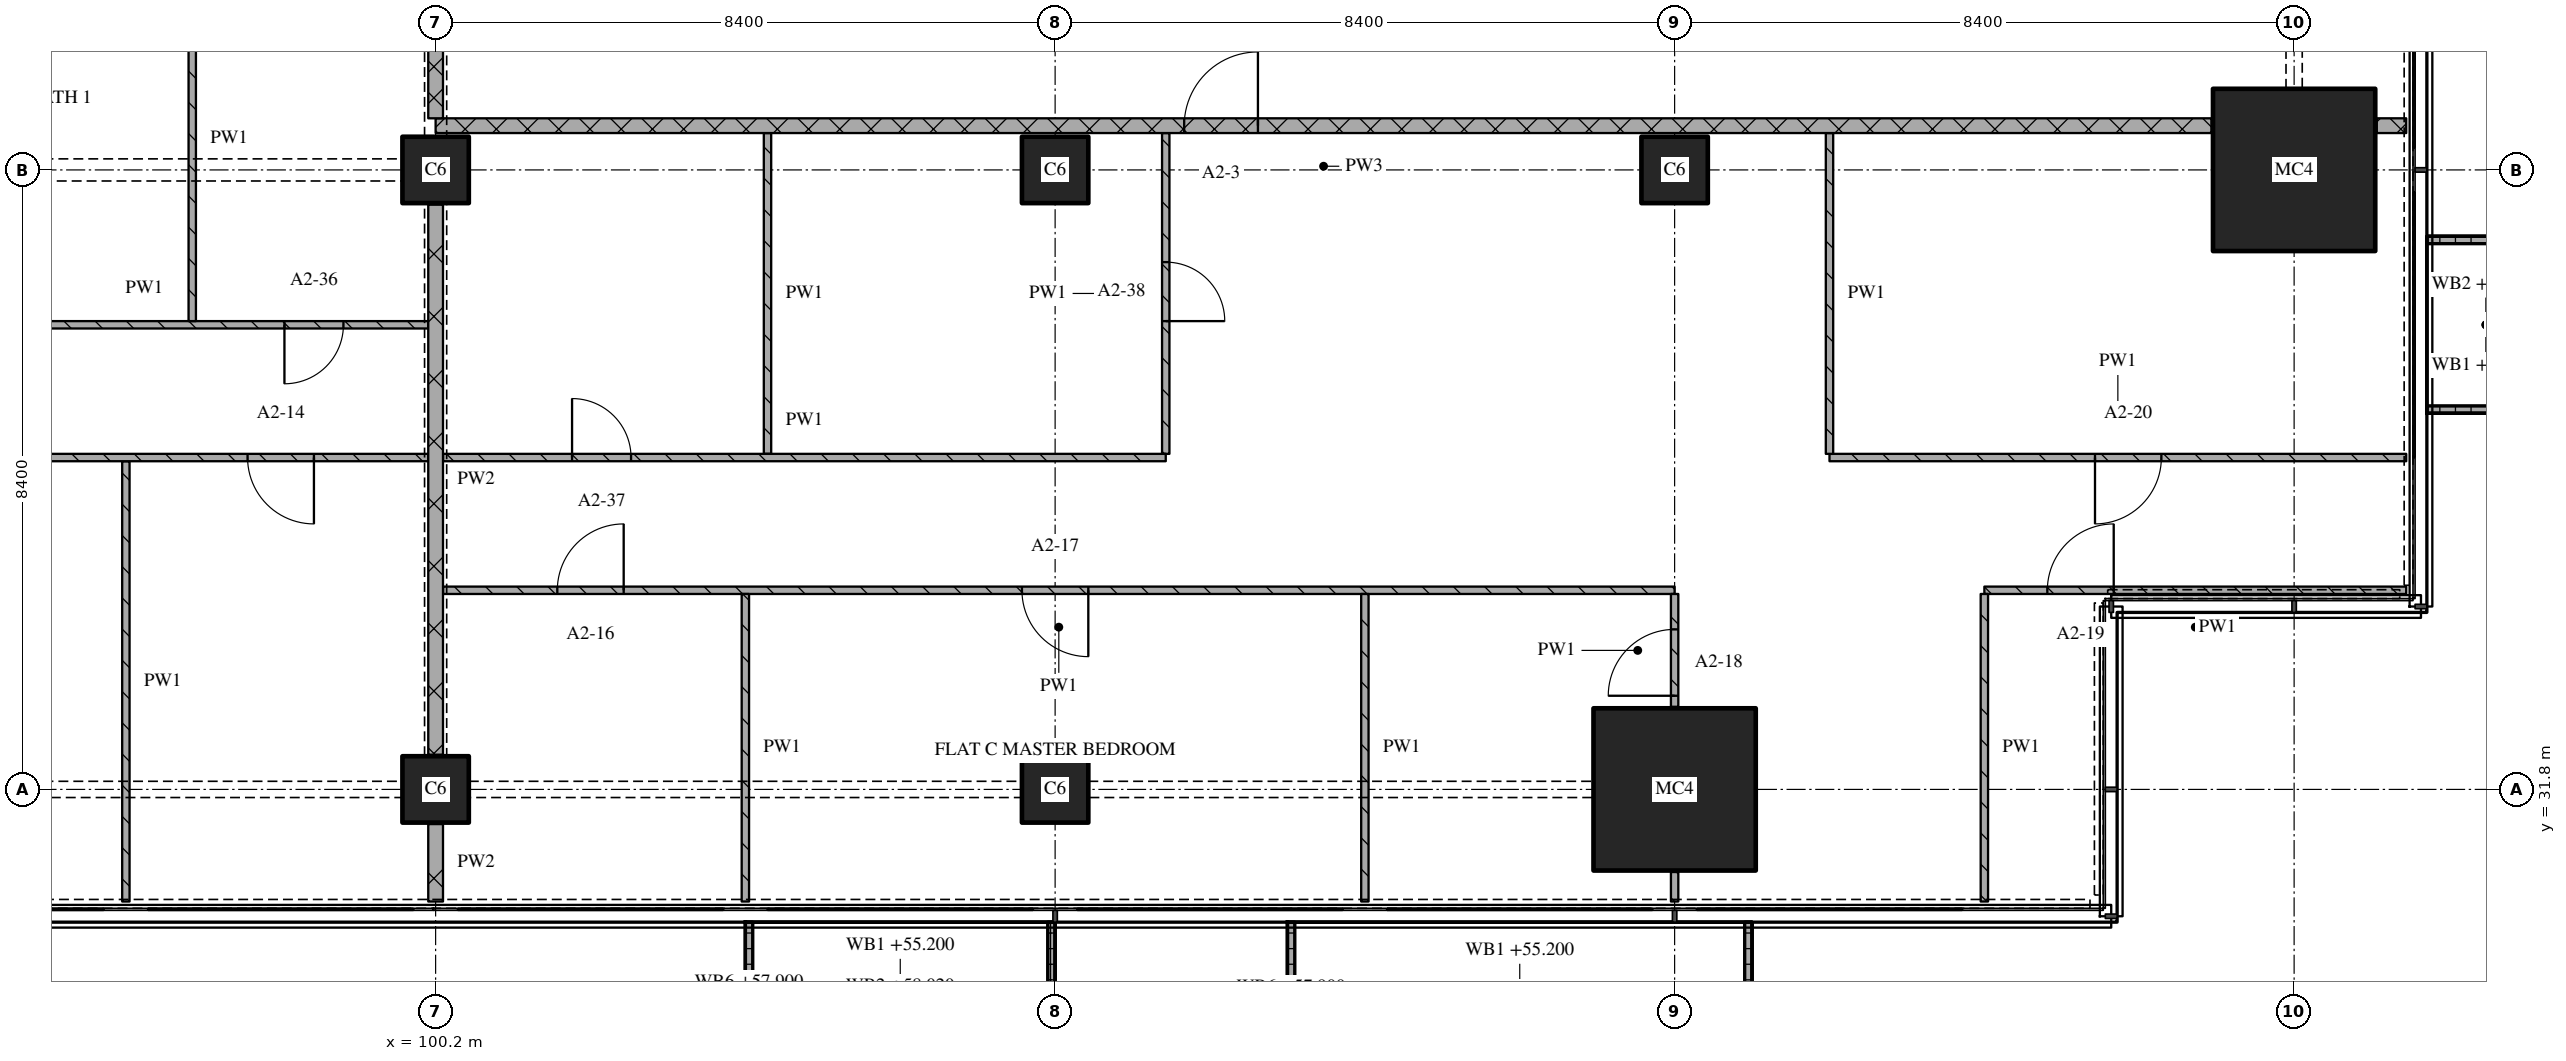
"""IFC4 building model, lengths in metres.
Left out: names, types, materials, properties, quantities, classifications, styles, units other than length and angle.
Written with IfcOpenShell. Run it as: python <this file> out.ifc"""

import sys

from ifc_helpers import new_model, si_unit, direction, frame, frame_2d, origin, origin_2d, place, context, subcontext, project, spatial, polyline, rectangle, outline, extrude, element, fill, save


model = new_model("IFC4")
c1 = context("Model", 3, precision=1e-05, world=origin(), true_north=direction((0.0, 1.0)))
c2 = subcontext(c1, "Body", "Model", "MODEL_VIEW")
j1 = project(units=[si_unit("LENGTHUNIT", "METRE"), si_unit("PLANEANGLEUNIT", "RADIAN")], contexts=[c1])
p1 = place(None, origin())
s1 = spatial("IfcSite", under=j1, at=p1, CompositionType="ELEMENT")
p2 = place(p1, origin())
s2 = spatial("IfcBuilding", under=s1, at=p2, CompositionType="ELEMENT")
p3 = place(p2, frame((0.0, 0.0, 55.2)))
s3 = spatial("IfcBuildingStorey", under=s2, at=p3, CompositionType="ELEMENT", Elevation=55.2)
for number, where, z_axis, x_axis in (
    (1, (100.2, 31.8, 0.0), (0.0, 0.0, 1.0), (1.0, 0.0, 0.0)),
    (2, (100.2, 40.2, 0.0), (0.0, 0.0, 1.0), (1.0, 0.0, 0.0)),
    (3, (108.6, 31.8, 0.0), (0.0, 0.0, 1.0), (1.0, 0.0, 0.0)),
    (4, (108.6, 40.2, 0.0), (0.0, 0.0, 1.0), (1.0, 0.0, 0.0)),
):
    element("IfcColumn", number, at=place(p3, frame(where, z_axis=z_axis, x_axis=x_axis)), inside=s3, PredefinedType="COLUMN", context=c2, shape_type="SweptSolid", body=[
        extrude(rectangle(XDim=0.9, YDim=0.9, at=origin_2d()), origin(), (0.0, 0.0, 1.0), 3.6),
    ])
p4 = place(p3, frame((117.0, 31.8, 0.0), z_axis=(0.0, 0.0, 1.0), x_axis=(1.0, 0.0, 0.0)))
e5 = element("IfcColumn", 5, at=p4, inside=s3, PredefinedType="COLUMN", context=c2, shape_type="SweptSolid", body=[
    extrude(rectangle(XDim=2.2, YDim=2.2, at=origin_2d()), origin(), (0.0, 0.0, 1.0), 3.6),
])
p5 = place(p3, frame((117.0, 40.2, 0.0), z_axis=(0.0, 0.0, 1.0), x_axis=(1.0, 0.0, 0.0)))
e6 = element("IfcColumn", 6, at=p5, inside=s3, PredefinedType="COLUMN", context=c2, shape_type="SweptSolid", body=[
    extrude(rectangle(XDim=0.9, YDim=0.9, at=origin_2d()), origin(), (0.0, 0.0, 1.0), 3.6),
])
p6 = place(p3, frame((125.4, 40.2, 0.0), z_axis=(0.0, 0.0, 1.0), x_axis=(1.0, 0.0, 0.0)))
e7 = element("IfcColumn", 7, at=p6, inside=s3, PredefinedType="COLUMN", context=c2, shape_type="SweptSolid", body=[
    extrude(rectangle(XDim=2.2, YDim=2.2, at=origin_2d()), origin(), (0.0, 0.0, 1.0), 3.6),
])
p7 = place(p3, origin())
e8 = element("IfcWall", 8, at=p7, inside=s3, PredefinedType="SOLIDWALL", context=c2, shape_type="SweptSolid", body=[
    extrude(outline(polyline([(104.4, 30.0), (104.5, 30.0), (104.5, 28.367), (108.5, 28.367), (108.5, 30.0), (108.6, 30.0), (108.6, 28.267), (104.4, 28.267), (104.4, 30.0)])), origin(), (0.0, 0.0, 1.0), 1.0),
])
p8 = place(p3, origin())
e9 = element("IfcWall", 9, at=p8, inside=s3, PredefinedType="SOLIDWALL", context=c2, shape_type="SweptSolid", body=[
    extrude(outline(polyline([(111.75, 30.0), (111.85, 30.0), (111.85, 28.233), (117.95, 28.233), (117.95, 30.0), (118.05, 30.0), (118.05, 28.133), (111.75, 28.133), (111.75, 30.0)])), origin(), (0.0, 0.0, 1.0), 1.0),
])
p9 = place(p3, origin())
e10 = element("IfcWall", 10, at=p9, inside=s3, PredefinedType="SOLIDWALL", context=c2, shape_type="SweptSolid", body=[
    extrude(outline(polyline([(127.2, 36.9), (127.2, 37.0), (128.7, 37.0), (128.7, 39.2), (127.2, 39.2), (127.2, 39.3), (128.8, 39.3), (128.8, 36.9), (127.2, 36.9)])), origin(), (0.0, 0.0, 1.0), 1.0),
])
p10 = place(p3, frame((117.0, 34.5, 0.0), z_axis=(0.0, 0.0, 1.0), x_axis=(-1.0, 0.0, 0.0)))
e11 = element("IfcWall", 11, at=p10, inside=s3, PredefinedType="PARTITIONING", context=c2, shape_type="SweptSolid", body=[
    extrude(rectangle(XDim=16.7, YDim=0.1, at=frame_2d((8.35, 0.0))), origin(), (0.0, 0.0, 1.0), 3.32),
])
p11 = place(p10, frame((7.95, 0.0, 0.0)))
e12 = element("IfcOpeningElement", 12, at=p11, cuts=e11, PredefinedType="OPENING", context=c2, shape_type="SweptSolid", body=[
    extrude(rectangle(XDim=0.9, YDim=2.1, at=frame_2d((0.45, 1.05))), frame((0.0, 0.06, 0.0), z_axis=(0.0, -1.0, 0.0), x_axis=(1.0, 0.0, 0.0)), (0.0, 0.0, 1.0), 0.12),
])
p12 = place(p10, frame((14.25, 0.0, 0.0)))
e13 = element("IfcOpeningElement", 13, at=p12, cuts=e11, PredefinedType="OPENING", context=c2, shape_type="SweptSolid", body=[
    extrude(rectangle(XDim=0.9, YDim=2.1, at=frame_2d((0.45, 1.05))), frame((0.0, 0.06, 0.0), z_axis=(0.0, -1.0, 0.0), x_axis=(1.0, 0.0, 0.0)), (0.0, 0.0, 1.0), 0.12),
])
p13 = place(p3, frame((126.92, 34.5, 0.0), z_axis=(0.0, 0.0, 1.0), x_axis=(-1.0, 0.0, 0.0)))
e14 = element("IfcWall", 14, at=p13, inside=s3, PredefinedType="PARTITIONING", context=c2, shape_type="SweptSolid", body=[
    extrude(rectangle(XDim=5.72, YDim=0.1, at=frame_2d((2.86, 0.0))), origin(), (0.0, 0.0, 1.0), 3.32),
])
p14 = place(p13, frame((3.966, 0.0, 0.0)))
e15 = element("IfcOpeningElement", 15, at=p14, cuts=e14, PredefinedType="OPENING", context=c2, shape_type="SweptSolid", body=[
    extrude(rectangle(XDim=0.9, YDim=2.1, at=frame_2d((0.45, 1.05))), frame((0.0, 0.06, 0.0), z_axis=(0.0, -1.0, 0.0), x_axis=(1.0, 0.0, 0.0)), (0.0, 0.0, 1.0), 0.12),
])
p15 = place(p3, frame((119.1, 36.3, 0.0), z_axis=(0.0, 0.0, 1.0), x_axis=(1.0, 0.0, 0.0)))
e16 = element("IfcWall", 16, at=p15, inside=s3, PredefinedType="PARTITIONING", context=c2, shape_type="SweptSolid", body=[
    extrude(rectangle(XDim=7.82, YDim=0.1, at=frame_2d((3.91, 0.0))), origin(), (0.0, 0.0, 1.0), 3.32),
])
p16 = place(p15, frame((3.6, 0.0, 0.0)))
e17 = element("IfcOpeningElement", 17, at=p16, cuts=e16, PredefinedType="OPENING", context=c2, shape_type="SweptSolid", body=[
    extrude(rectangle(XDim=0.9, YDim=2.1, at=frame_2d((0.45, 1.05))), frame((0.0, 0.06, 0.0), z_axis=(0.0, -1.0, 0.0), x_axis=(1.0, 0.0, 0.0)), (0.0, 0.0, 1.0), 0.12),
])
p17 = place(p3, frame((92.4, 38.1, 0.0), z_axis=(0.0, 0.0, 1.0), x_axis=(1.0, 0.0, 0.0)))
e18 = element("IfcWall", 18, at=p17, inside=s3, PredefinedType="PARTITIONING", context=c2, shape_type="SweptSolid", body=[
    extrude(rectangle(XDim=7.7, YDim=0.1, at=frame_2d((3.85, 0.0))), origin(), (0.0, 0.0, 1.0), 3.32),
])
p18 = place(p17, frame((5.75, 0.0, 0.0)))
e19 = element("IfcOpeningElement", 19, at=p18, cuts=e18, PredefinedType="OPENING", context=c2, shape_type="SweptSolid", body=[
    extrude(rectangle(XDim=0.8, YDim=2.1, at=frame_2d((0.4, 1.05))), frame((0.0, 0.06, 0.0), z_axis=(0.0, -1.0, 0.0), x_axis=(1.0, 0.0, 0.0)), (0.0, 0.0, 1.0), 0.12),
])
p19 = place(p3, frame((124.28, 40.8, 0.0), z_axis=(0.0, 0.0, 1.0), x_axis=(-1.0, 0.0, 0.0)))
e20 = element("IfcWall", 20, at=p19, inside=s3, PredefinedType="PARTITIONING", context=c2, shape_type="SweptSolid", body=[
    extrude(rectangle(XDim=24.08, YDim=0.2, at=frame_2d((12.04, 0.0))), origin(), (0.0, 0.0, 1.0), 3.32),
])
p20 = place(p19, frame((12.93, 0.0, 0.0)))
e21 = element("IfcOpeningElement", 21, at=p20, cuts=e20, PredefinedType="OPENING", context=c2, shape_type="SweptSolid", body=[
    extrude(rectangle(XDim=1.0, YDim=2.1, at=frame_2d((0.5, 1.05))), frame((0.0, 0.11, 0.0), z_axis=(0.0, -1.0, 0.0), x_axis=(1.0, 0.0, 0.0)), (0.0, 0.0, 1.0), 0.22),
])
p21 = place(p3, frame((126.52, 40.8, 0.0), z_axis=(0.0, 0.0, 1.0), x_axis=(1.0, 0.0, 0.0)))
e22 = element("IfcWall", 22, at=p21, inside=s3, PredefinedType="PARTITIONING", context=c2, shape_type="SweptSolid", body=[
    extrude(rectangle(XDim=0.4, YDim=0.2, at=frame_2d((0.2, 0.0))), origin(), (0.0, 0.0, 1.0), 3.32),
])
p22 = place(p3, frame((96.0, 36.25, 0.0), z_axis=(0.0, 0.0, 1.0), x_axis=(0.0, -1.0, 0.0)))
e23 = element("IfcWall", 23, at=p22, inside=s3, PredefinedType="PARTITIONING", context=c2, shape_type="SweptSolid", body=[
    extrude(rectangle(XDim=5.97, YDim=0.1, at=frame_2d((2.985, 0.0))), origin(), (0.0, 0.0, 1.0), 3.32),
])
p23 = place(p3, frame((96.9, 43.1, 0.0), z_axis=(0.0, 0.0, 1.0), x_axis=(0.0, -1.0, 0.0)))
e24 = element("IfcWall", 24, at=p23, inside=s3, PredefinedType="PARTITIONING", context=c2, shape_type="SweptSolid", body=[
    extrude(rectangle(XDim=4.95, YDim=0.1, at=frame_2d((2.475, 0.0))), origin(), (0.0, 0.0, 1.0), 3.32),
])
p24 = place(p3, frame((100.2, 43.1, 0.0), z_axis=(0.0, 0.0, 1.0), x_axis=(0.0, -1.0, 0.0)))
e25 = element("IfcWall", 25, at=p24, inside=s3, PredefinedType="PARTITIONING", context=c2, shape_type="SweptSolid", body=[
    extrude(rectangle(XDim=2.2, YDim=0.2, at=frame_2d((1.1, 0.0))), origin(), (0.0, 0.0, 1.0), 2.43),
])
p25 = place(p3, frame((100.2, 31.33, 0.0), z_axis=(0.0, 0.0, 1.0), x_axis=(0.0, -1.0, 0.0)))
e26 = element("IfcWall", 26, at=p25, inside=s3, PredefinedType="PARTITIONING", context=c2, shape_type="SweptSolid", body=[
    extrude(rectangle(XDim=1.05, YDim=0.2, at=frame_2d((0.525, 0.0))), origin(), (0.0, 0.0, 1.0), 3.32),
])
p26 = place(p3, frame((100.2, 39.73, 0.0), z_axis=(0.0, 0.0, 1.0), x_axis=(0.0, -1.0, 0.0)))
e27 = element("IfcWall", 27, at=p26, inside=s3, PredefinedType="PARTITIONING", context=c2, shape_type="SweptSolid", body=[
    extrude(rectangle(XDim=7.46, YDim=0.2, at=frame_2d((3.73, 0.0))), origin(), (0.0, 0.0, 1.0), 2.83),
])
p27 = place(p3, frame((104.4, 34.45, 0.0), z_axis=(0.0, 0.0, 1.0), x_axis=(0.0, -1.0, 0.0)))
e28 = element("IfcWall", 28, at=p27, inside=s3, PredefinedType="PARTITIONING", context=c2, shape_type="SweptSolid", body=[
    extrude(rectangle(XDim=4.17, YDim=0.1, at=frame_2d((2.085, 0.0))), origin(), (0.0, 0.0, 1.0), 3.32),
])
p28 = place(p3, frame((104.7, 40.7, 0.0), z_axis=(0.0, 0.0, 1.0), x_axis=(0.0, -1.0, 0.0)))
e29 = element("IfcWall", 29, at=p28, inside=s3, PredefinedType="PARTITIONING", context=c2, shape_type="SweptSolid", body=[
    extrude(rectangle(XDim=4.35, YDim=0.1, at=frame_2d((2.175, 0.0))), origin(), (0.0, 0.0, 1.0), 3.32),
])
p29 = place(p3, frame((110.1, 36.35, 0.0), z_axis=(0.0, 0.0, 1.0), x_axis=(0.0, 1.0, 0.0)))
e30 = element("IfcWall", 30, at=p29, inside=s3, PredefinedType="PARTITIONING", context=c2, shape_type="SweptSolid", body=[
    extrude(rectangle(XDim=4.35, YDim=0.1, at=frame_2d((2.175, 0.0))), origin(), (0.0, 0.0, 1.0), 3.32),
])
p30 = place(p29, frame((1.8, 0.0, 0.0)))
e31 = element("IfcOpeningElement", 31, at=p30, cuts=e30, PredefinedType="OPENING", context=c2, shape_type="SweptSolid", body=[
    extrude(rectangle(XDim=0.8, YDim=2.1, at=frame_2d((0.4, 1.05))), frame((0.0, 0.06, 0.0), z_axis=(0.0, -1.0, 0.0), x_axis=(1.0, 0.0, 0.0)), (0.0, 0.0, 1.0), 0.12),
])
p31 = place(p3, frame((112.8, 34.45, 0.0), z_axis=(0.0, 0.0, 1.0), x_axis=(0.0, -1.0, 0.0)))
e32 = element("IfcWall", 32, at=p31, inside=s3, PredefinedType="PARTITIONING", context=c2, shape_type="SweptSolid", body=[
    extrude(rectangle(XDim=4.17, YDim=0.1, at=frame_2d((2.085, 0.0))), origin(), (0.0, 0.0, 1.0), 3.32),
])
p32 = place(p3, frame((117.0, 30.68, 0.0), z_axis=(0.0, 0.0, 1.0), x_axis=(0.0, -1.0, 0.0)))
e33 = element("IfcWall", 33, at=p32, inside=s3, PredefinedType="PARTITIONING", context=c2, shape_type="SweptSolid", body=[
    extrude(rectangle(XDim=0.4, YDim=0.1, at=frame_2d((0.2, 0.0))), origin(), (0.0, 0.0, 1.0), 3.32),
])
p33 = place(p3, frame((117.0, 32.92, 0.0), z_axis=(0.0, 0.0, 1.0), x_axis=(0.0, 1.0, 0.0)))
e34 = element("IfcWall", 34, at=p33, inside=s3, PredefinedType="PARTITIONING", context=c2, shape_type="SweptSolid", body=[
    extrude(rectangle(XDim=1.53, YDim=0.1, at=frame_2d((0.765, 0.0))), origin(), (0.0, 0.0, 1.0), 3.32),
])
p34 = place(p33, frame((0.15, 0.0, 0.0)))
e35 = element("IfcOpeningElement", 35, at=p34, cuts=e34, PredefinedType="OPENING", context=c2, shape_type="SweptSolid", body=[
    extrude(rectangle(XDim=0.9, YDim=2.1, at=frame_2d((0.45, 1.05))), frame((0.0, 0.06, 0.0), z_axis=(0.0, -1.0, 0.0), x_axis=(1.0, 0.0, 0.0)), (0.0, 0.0, 1.0), 0.12),
])
p35 = place(p3, frame((119.1, 40.7, 0.0), z_axis=(0.0, 0.0, 1.0), x_axis=(0.0, -1.0, 0.0)))
e36 = element("IfcWall", 36, at=p35, inside=s3, PredefinedType="PARTITIONING", context=c2, shape_type="SweptSolid", body=[
    extrude(rectangle(XDim=4.35, YDim=0.1, at=frame_2d((2.175, 0.0))), origin(), (0.0, 0.0, 1.0), 3.32),
])
p36 = place(p3, frame((121.2, 34.45, 0.0), z_axis=(0.0, 0.0, 1.0), x_axis=(0.0, -1.0, 0.0)))
e37 = element("IfcWall", 37, at=p36, inside=s3, PredefinedType="PARTITIONING", context=c2, shape_type="SweptSolid", body=[
    extrude(rectangle(XDim=4.17, YDim=0.1, at=frame_2d((2.085, 0.0))), origin(), (0.0, 0.0, 1.0), 3.32),
])
p37 = place(p3, frame((100.1, 36.3, 0.0), z_axis=(0.0, 0.0, 1.0), x_axis=(-1.0, 0.0, 0.0)))
e38 = element("IfcWall", 38, at=p37, inside=s3, PredefinedType="PARTITIONING", context=c2, shape_type="SweptSolid", body=[
    extrude(rectangle(XDim=12.5, YDim=0.1, at=frame_2d((6.25, 0.0))), origin(), (0.0, 0.0, 1.0), 3.32),
])
p38 = place(p37, frame((1.55, 0.0, 0.0)))
e39 = element("IfcOpeningElement", 39, at=p38, cuts=e38, PredefinedType="OPENING", context=c2, shape_type="SweptSolid", body=[
    extrude(rectangle(XDim=0.9, YDim=2.1, at=frame_2d((0.45, 1.05))), frame((0.0, 0.06, 0.0), z_axis=(0.0, -1.0, 0.0), x_axis=(1.0, 0.0, 0.0)), (0.0, 0.0, 1.0), 0.12),
])
p39 = place(p37, frame((7.85, 0.0, 0.0)))
e40 = element("IfcOpeningElement", 40, at=p39, cuts=e38, PredefinedType="OPENING", context=c2, shape_type="SweptSolid", body=[
    extrude(rectangle(XDim=0.9, YDim=2.1, at=frame_2d((0.45, 1.05))), frame((0.0, 0.06, 0.0), z_axis=(0.0, -1.0, 0.0), x_axis=(1.0, 0.0, 0.0)), (0.0, 0.0, 1.0), 0.12),
])
p40 = place(p3, frame((100.3, 36.3, 0.0), z_axis=(0.0, 0.0, 1.0), x_axis=(1.0, 0.0, 0.0)))
e41 = element("IfcWall", 41, at=p40, inside=s3, PredefinedType="PARTITIONING", context=c2, shape_type="SweptSolid", body=[
    extrude(rectangle(XDim=9.8, YDim=0.1, at=frame_2d((4.9, 0.0))), origin(), (0.0, 0.0, 1.0), 3.32),
])
p41 = place(p40, frame((1.75, 0.0, 0.0)))
e42 = element("IfcOpeningElement", 42, at=p41, cuts=e41, PredefinedType="OPENING", context=c2, shape_type="SweptSolid", body=[
    extrude(rectangle(XDim=0.8, YDim=2.1, at=frame_2d((0.4, 1.05))), frame((0.0, 0.06, 0.0), z_axis=(0.0, -1.0, 0.0), x_axis=(1.0, 0.0, 0.0)), (0.0, 0.0, 1.0), 0.12),
])
p42 = place(p11, origin())
e43 = element("IfcDoor", 43, at=p42, inside=s3, OperationType="SINGLE_SWING_LEFT", PredefinedType="DOOR", context=c2, shape_type="SweptSolid", body=[
    extrude(rectangle(XDim=0.9, YDim=2.1, at=frame_2d((0.45, 1.05))), frame((0.0, 0.025, 0.0), z_axis=(0.0, -1.0, 0.0), x_axis=(1.0, 0.0, 0.0)), (0.0, 0.0, 1.0), 0.05),
])
fill(e12, e43)
p43 = place(p12, origin())
e44 = element("IfcDoor", 44, at=p43, inside=s3, OperationType="SINGLE_SWING_RIGHT", PredefinedType="DOOR", context=c2, shape_type="SweptSolid", body=[
    extrude(rectangle(XDim=0.9, YDim=2.1, at=frame_2d((0.45, 1.05))), frame((0.0, 0.025, 0.0), z_axis=(0.0, -1.0, 0.0), x_axis=(1.0, 0.0, 0.0)), (0.0, 0.0, 1.0), 0.05),
])
fill(e13, e44)
p44 = place(p14, origin())
e45 = element("IfcDoor", 45, at=p44, inside=s3, OperationType="SINGLE_SWING_RIGHT", PredefinedType="DOOR", context=c2, shape_type="SweptSolid", body=[
    extrude(rectangle(XDim=0.9, YDim=2.1, at=frame_2d((0.45, 1.05))), frame((0.0, 0.025, 0.0), z_axis=(0.0, -1.0, 0.0), x_axis=(1.0, 0.0, 0.0)), (0.0, 0.0, 1.0), 0.05),
])
fill(e15, e45)
p45 = place(p16, origin())
e46 = element("IfcDoor", 46, at=p45, inside=s3, OperationType="SINGLE_SWING_RIGHT", PredefinedType="DOOR", context=c2, shape_type="SweptSolid", body=[
    extrude(rectangle(XDim=0.9, YDim=2.1, at=frame_2d((0.45, 1.05))), frame((0.0, 0.025, 0.0), z_axis=(0.0, -1.0, 0.0), x_axis=(1.0, 0.0, 0.0)), (0.0, 0.0, 1.0), 0.05),
])
fill(e17, e46)
p46 = place(p18, origin())
e47 = element("IfcDoor", 47, at=p46, inside=s3, OperationType="SINGLE_SWING_RIGHT", PredefinedType="DOOR", context=c2, shape_type="SweptSolid", body=[
    extrude(rectangle(XDim=0.8, YDim=2.1, at=frame_2d((0.4, 1.05))), frame((0.0, 0.025, 0.0), z_axis=(0.0, -1.0, 0.0), x_axis=(1.0, 0.0, 0.0)), (0.0, 0.0, 1.0), 0.05),
])
fill(e19, e47)
p47 = place(p20, origin())
e48 = element("IfcDoor", 48, at=p47, inside=s3, OperationType="SINGLE_SWING_RIGHT", PredefinedType="DOOR", context=c2, shape_type="SweptSolid", body=[
    extrude(rectangle(XDim=1.0, YDim=2.1, at=frame_2d((0.5, 1.05))), frame((0.0, 0.025, 0.0), z_axis=(0.0, -1.0, 0.0), x_axis=(1.0, 0.0, 0.0)), (0.0, 0.0, 1.0), 0.05),
])
fill(e21, e48)
p48 = place(p30, origin())
e49 = element("IfcDoor", 49, at=p48, inside=s3, OperationType="SINGLE_SWING_RIGHT", PredefinedType="DOOR", context=c2, shape_type="SweptSolid", body=[
    extrude(rectangle(XDim=0.8, YDim=2.1, at=frame_2d((0.4, 1.05))), frame((0.0, 0.025, 0.0), z_axis=(0.0, -1.0, 0.0), x_axis=(1.0, 0.0, 0.0)), (0.0, 0.0, 1.0), 0.05),
])
fill(e31, e49)
p49 = place(p34, origin())
e50 = element("IfcDoor", 50, at=p49, inside=s3, OperationType="SINGLE_SWING_LEFT", PredefinedType="DOOR", context=c2, shape_type="SweptSolid", body=[
    extrude(rectangle(XDim=0.9, YDim=2.1, at=frame_2d((0.45, 1.05))), frame((0.0, 0.025, 0.0), z_axis=(0.0, -1.0, 0.0), x_axis=(1.0, 0.0, 0.0)), (0.0, 0.0, 1.0), 0.05),
])
fill(e35, e50)
p50 = place(p38, origin())
e51 = element("IfcDoor", 51, at=p50, inside=s3, OperationType="SINGLE_SWING_LEFT", PredefinedType="DOOR", context=c2, shape_type="SweptSolid", body=[
    extrude(rectangle(XDim=0.9, YDim=2.1, at=frame_2d((0.45, 1.05))), frame((0.0, 0.025, 0.0), z_axis=(0.0, -1.0, 0.0), x_axis=(1.0, 0.0, 0.0)), (0.0, 0.0, 1.0), 0.05),
])
fill(e39, e51)
p51 = place(p41, origin())
e52 = element("IfcDoor", 52, at=p51, inside=s3, OperationType="SINGLE_SWING_LEFT", PredefinedType="DOOR", context=c2, shape_type="SweptSolid", body=[
    extrude(rectangle(XDim=0.8, YDim=2.1, at=frame_2d((0.4, 1.05))), frame((0.0, 0.025, 0.0), z_axis=(0.0, -1.0, 0.0), x_axis=(1.0, 0.0, 0.0)), (0.0, 0.0, 1.0), 0.05),
])
fill(e42, e52)
save(model, sys.argv[1])
